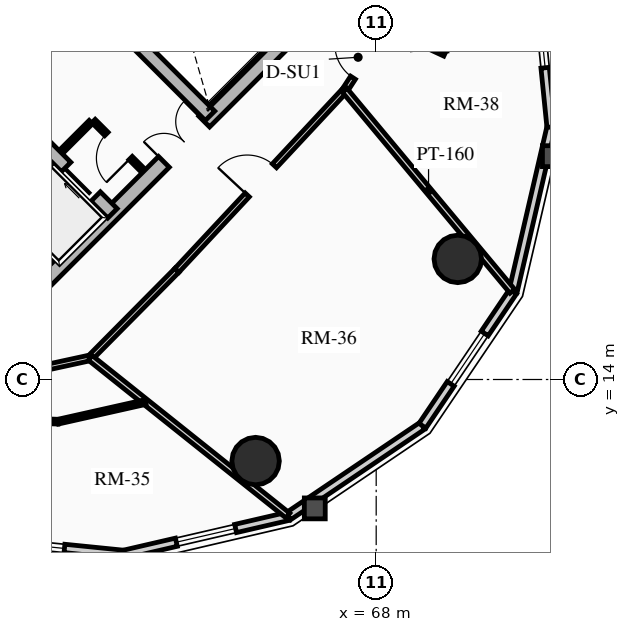
"""IFC4 building model, lengths in metres.
Left out: names, types, materials, properties, quantities, classifications, styles, units other than length and angle.
Written with IfcOpenShell. Run it as: python <this file> out.ifc"""

import sys

from ifc_helpers import new_model, si_unit, direction, frame, frame_2d, origin, origin_2d, place, context, subcontext, project, spatial, rectangle, circle, extrude, source, transform, mapped, element, fill, save


model = new_model("IFC4")
c1 = context("Model", 3, precision=1e-05, world=origin(), true_north=direction((0.0, 1.0)))
c2 = subcontext(c1, "Body", "Model", "MODEL_VIEW")
j1 = project(units=[si_unit("LENGTHUNIT", "METRE"), si_unit("PLANEANGLEUNIT", "RADIAN")], contexts=[c1])
p1 = place(None, origin())
s1 = spatial("IfcSite", under=j1, at=p1, CompositionType="ELEMENT")
p2 = place(p1, origin())
s2 = spatial("IfcBuilding", under=s1, at=p2, CompositionType="ELEMENT")
p3 = place(p2, frame((0.0, 0.0, 174.88)))
s3 = spatial("IfcBuildingStorey", under=s2, at=p3, CompositionType="ELEMENT", Elevation=174.88)
p4 = place(p3, frame((58.561, 15.873, 0.0), z_axis=(0.0, 0.0, 1.0), x_axis=(0.707106781187, 0.707106781187, 0.0)))
e1 = element("IfcWall", 1, at=p4, inside=s3, PredefinedType="SHEAR", context=c2, shape_type="SweptSolid", body=[
    extrude(rectangle(XDim=10.7, YDim=0.4, at=frame_2d((5.35, 0.0))), origin(), (0.0, 0.0, 1.0), 2.91),
])
m1 = source(origin(), c2, "Body", "SweptSolid", [
    extrude(rectangle(XDim=1.5, YDim=2.02, at=frame_2d((0.75, 1.01))), frame((0.0, 0.21, 0.0), z_axis=(0.0, -1.0, 0.0), x_axis=(1.0, 0.0, 0.0)), (0.0, 0.0, 1.0), 0.42),
])
p5 = place(p4, frame((5.45, 0.0, 0.0)))
e2 = element("IfcOpeningElement", 2, at=p5, cuts=e1, PredefinedType="OPENING", context=c2, shape_type="MappedRepresentation", body=[
    mapped(m1, transform((0.0, 0.0, 0.0), x_axis=(1.0, 0.0, 0.0), y_axis=(0.0, 1.0, 0.0), z_axis=(0.0, 0.0, 1.0), scale=1.0)),
])
p6 = place(p3, frame((61.06, 18.373, 0.0), z_axis=(0.0, 0.0, 1.0), x_axis=(-0.707106781187, 0.707106781187, 0.0)))
e3 = element("IfcWall", 3, at=p6, inside=s3, PredefinedType="SHEAR", context=c2, shape_type="SweptSolid", body=[
    extrude(rectangle(XDim=13.7, YDim=0.35, at=frame_2d((6.85, 0.0))), origin(), (0.0, 0.0, 1.0), 2.91),
])
m2 = source(origin(), c2, "Body", "SweptSolid", [
    extrude(rectangle(XDim=1.1, YDim=2.015, at=frame_2d((0.55, 1.007))), frame((0.0, 0.185, 0.0), z_axis=(0.0, -1.0, 0.0), x_axis=(1.0, 0.0, 0.0)), (0.0, 0.0, 1.0), 0.37),
])
p7 = place(p6, frame((4.85, 0.0, 0.0)))
e4 = element("IfcOpeningElement", 4, at=p7, cuts=e3, PredefinedType="OPENING", context=c2, shape_type="MappedRepresentation", body=[
    mapped(m2, transform((0.0, 0.0, 0.0), x_axis=(1.0, 0.0, 0.0), y_axis=(0.0, 1.0, 0.0), z_axis=(0.0, 0.0, 1.0), scale=1.0)),
])
p8 = place(p6, frame((0.625, 0.0, 0.0)))
e5 = element("IfcOpeningElement", 5, at=p8, cuts=e3, PredefinedType="OPENING", context=c2, shape_type="MappedRepresentation", body=[
    mapped(m2, transform((0.0, 0.0, 0.0), x_axis=(1.0, 0.0, 0.0), y_axis=(0.0, 1.0, 0.0), z_axis=(0.0, 0.0, 1.0), scale=1.0)),
])
p9 = place(p6, frame((2.625, 0.0, 0.0)))
e6 = element("IfcOpeningElement", 6, at=p9, cuts=e3, PredefinedType="OPENING", context=c2, shape_type="MappedRepresentation", body=[
    mapped(m2, transform((0.0, 0.0, 0.0), x_axis=(1.0, 0.0, 0.0), y_axis=(0.0, 1.0, 0.0), z_axis=(0.0, 0.0, 1.0), scale=1.0)),
])
m3 = source(origin(), c2, "Body", "SweptSolid", [
    extrude(rectangle(XDim=1.15, YDim=2.02, at=frame_2d((0.575, 1.01))), frame((0.0, 0.185, 0.0), z_axis=(0.0, -1.0, 0.0), x_axis=(1.0, 0.0, 0.0)), (0.0, 0.0, 1.0), 0.37),
])
p10 = place(p6, frame((7.27, 0.0, 0.0)))
e7 = element("IfcOpeningElement", 7, at=p10, cuts=e3, PredefinedType="OPENING", context=c2, shape_type="MappedRepresentation", body=[
    mapped(m3, transform((0.0, 0.0, 0.0), x_axis=(1.0, 0.0, 0.0), y_axis=(0.0, 1.0, 0.0), z_axis=(0.0, 0.0, 1.0), scale=1.0)),
])
p11 = place(p3, frame((63.627, 20.94, 0.0), z_axis=(0.0, 0.0, 1.0), x_axis=(-0.707119496762, 0.707094065383, 0.0)))
e8 = element("IfcWall", 8, at=p11, inside=s3, PredefinedType="SHEAR", context=c2, shape_type="SweptSolid", body=[
    extrude(rectangle(XDim=9.6, YDim=0.35, at=frame_2d((4.8, 0.0))), origin(), (0.0, 0.0, 1.0), 2.91),
])
p12 = place(p11, frame((5.28, 0.0, 0.0)))
e9 = element("IfcOpeningElement", 9, at=p12, cuts=e8, PredefinedType="OPENING", context=c2, shape_type="MappedRepresentation", body=[
    mapped(m3, transform((0.0, 0.0, 0.0), x_axis=(1.0, 0.0, 0.0), y_axis=(0.0, 1.0, 0.0), z_axis=(0.0, 0.0, 1.0), scale=1.0)),
])
for number, where, z_axis, x_axis in (
    (10, (64.827, 11.854, 0.0), (0.0, 0.0, 1.0), (1.0, 0.0, 0.0)),
    (11, (70.146, 17.173, 0.0), (0.0, 0.0, 1.0), (1.0, 0.0, 0.0)),
):
    element("IfcColumn", number, at=place(p3, frame(where, z_axis=z_axis, x_axis=x_axis)), inside=s3, PredefinedType="USERDEFINED", context=c2, shape_type="SweptSolid", body=[
        extrude(circle(Radius=0.625, at=origin_2d()), origin(), (0.0, 0.0, 1.0), 2.91),
    ])
p13 = place(p3, frame((61.355, 9.397, 0.0), z_axis=(0.0, 0.0, 1.0), x_axis=(-0.994943283129, 0.100438356004, 0.0)))
e12 = element("IfcWall", 12, at=p13, inside=s3, PredefinedType="SOLIDWALL", context=c2, shape_type="SweptSolid", body=[
    extrude(rectangle(XDim=4.733, YDim=0.22, at=frame_2d((2.366, 0.0))), origin(), (0.0, 0.0, 1.0), 2.245),
])
m4 = source(origin(), c2, "Body", "SweptSolid", [
    extrude(rectangle(XDim=1.6, YDim=1.3, at=frame_2d((0.8, 0.65))), frame((0.0, 0.12, 0.0), z_axis=(0.0, -1.0, 0.0), x_axis=(1.0, 0.0, 0.0)), (0.0, 0.0, 1.0), 0.24),
])
p14 = place(p13, frame((1.566, 0.0, 0.65)))
e13 = element("IfcOpeningElement", 13, at=p14, cuts=e12, PredefinedType="OPENING", context=c2, shape_type="MappedRepresentation", body=[
    mapped(m4, transform((0.0, 0.0, 0.0), x_axis=(1.0, 0.0, 0.0), y_axis=(0.0, 1.0, 0.0), z_axis=(0.0, 0.0, 1.0), scale=1.0)),
])
p15 = place(p3, frame((65.687, 10.4, 0.0), z_axis=(0.0, 0.0, 1.0), x_axis=(-0.97422620202, -0.22557328587, 0.0)))
e14 = element("IfcWall", 14, at=p15, inside=s3, PredefinedType="SOLIDWALL", context=c2, shape_type="SweptSolid", body=[
    extrude(rectangle(XDim=4.446, YDim=0.22, at=frame_2d((2.223, 0.0))), origin(), (0.0, 0.0, 1.0), 2.245),
])
p16 = place(p15, frame((1.423, 0.0, 0.65)))
e15 = element("IfcOpeningElement", 15, at=p16, cuts=e14, PredefinedType="OPENING", context=c2, shape_type="MappedRepresentation", body=[
    mapped(m4, transform((0.0, 0.0, 0.0), x_axis=(1.0, 0.0, 0.0), y_axis=(0.0, 1.0, 0.0), z_axis=(0.0, 0.0, 1.0), scale=1.0)),
])
p17 = place(p3, frame((69.217, 12.783, 0.0), z_axis=(0.0, 0.0, 1.0), x_axis=(-0.828817439852, -0.55951912514, 0.0)))
e16 = element("IfcWall", 16, at=p17, inside=s3, PredefinedType="SOLIDWALL", context=c2, shape_type="SweptSolid", body=[
    extrude(rectangle(XDim=4.259, YDim=0.22, at=frame_2d((2.129, 0.0))), origin(), (0.0, 0.0, 1.0), 2.245),
])
p18 = place(p3, frame((71.6, 16.313, 0.0), z_axis=(0.0, 0.0, 1.0), x_axis=(-0.55951912514, -0.828817439852, 0.0)))
e17 = element("IfcWall", 17, at=p18, inside=s3, PredefinedType="SOLIDWALL", context=c2, shape_type="SweptSolid", body=[
    extrude(rectangle(XDim=4.259, YDim=0.22, at=frame_2d((2.129, 0.0))), origin(), (0.0, 0.0, 1.0), 2.245),
])
p19 = place(p18, frame((1.33, 0.0, 0.65)))
e18 = element("IfcOpeningElement", 18, at=p19, cuts=e17, PredefinedType="OPENING", context=c2, shape_type="MappedRepresentation", body=[
    mapped(m4, transform((0.0, 0.0, 0.0), x_axis=(1.0, 0.0, 0.0), y_axis=(0.0, 1.0, 0.0), z_axis=(0.0, 0.0, 1.0), scale=1.0)),
])
p20 = place(p3, frame((72.603, 20.645, 0.0), z_axis=(0.0, 0.0, 1.0), x_axis=(-0.22557328587, -0.97422620202, 0.0)))
e19 = element("IfcWall", 19, at=p20, inside=s3, PredefinedType="SOLIDWALL", context=c2, shape_type="SweptSolid", body=[
    extrude(rectangle(XDim=4.446, YDim=0.22, at=frame_2d((2.223, 0.0))), origin(), (0.0, 0.0, 1.0), 2.245),
])
p21 = place(p3, frame((72.127, 25.354, 0.0), z_axis=(0.0, 0.0, 1.0), x_axis=(0.100438356004, -0.994943283129, 0.0)))
e20 = element("IfcWall", 20, at=p21, inside=s3, PredefinedType="SOLIDWALL", context=c2, shape_type="SweptSolid", body=[
    extrude(rectangle(XDim=4.733, YDim=0.22, at=frame_2d((2.366, 0.0))), origin(), (0.0, 0.0, 1.0), 2.245),
])
p22 = place(p21, frame((1.566, 0.0, 0.65)))
e21 = element("IfcOpeningElement", 21, at=p22, cuts=e20, PredefinedType="OPENING", context=c2, shape_type="MappedRepresentation", body=[
    mapped(m4, transform((0.0, 0.0, 0.0), x_axis=(1.0, 0.0, 0.0), y_axis=(0.0, 1.0, 0.0), z_axis=(0.0, 0.0, 1.0), scale=1.0)),
])
p23 = place(p3, frame((58.214, 21.467, 0.0), z_axis=(0.0, 0.0, 1.0), x_axis=(0.707106781187, 0.707106781187, 0.0)))
e22 = element("IfcWall", 22, at=p23, inside=s3, PredefinedType="PARTITIONING", context=c2, shape_type="SweptSolid", body=[
    extrude(rectangle(XDim=3.28, YDim=0.2, at=frame_2d((1.64, 0.0))), origin(), (0.0, 0.0, 1.0), 2.675),
])
m5 = source(origin(), c2, "Body", "SweptSolid", [
    extrude(rectangle(XDim=1.5, YDim=2.02, at=frame_2d((0.75, 1.01))), frame((0.0, 0.11, 0.0), z_axis=(0.0, -1.0, 0.0), x_axis=(1.0, 0.0, 0.0)), (0.0, 0.0, 1.0), 0.22),
])
p24 = place(p23, frame((1.55, 0.0, 0.0)))
e23 = element("IfcOpeningElement", 23, at=p24, cuts=e22, PredefinedType="OPENING", context=c2, shape_type="MappedRepresentation", body=[
    mapped(m5, transform((0.0, 0.0, 0.0), x_axis=(1.0, 0.0, 0.0), y_axis=(0.0, 1.0, 0.0), z_axis=(0.0, 0.0, 1.0), scale=1.0)),
])
p25 = place(p3, frame((61.835, 19.529, 0.0), z_axis=(0.0, 0.0, 1.0), x_axis=(-0.707174592913, 0.707038962956, 0.0)))
e24 = element("IfcWall", 24, at=p25, inside=s3, PredefinedType="PARTITIONING", context=c2, shape_type="SweptSolid", body=[
    extrude(rectangle(XDim=1.8, YDim=0.125, at=frame_2d((0.9, 0.0))), origin(), (0.0, 0.0, 1.0), 2.675),
])
m6 = source(origin(), c2, "Body", "SweptSolid", [
    extrude(rectangle(XDim=0.9, YDim=2.005, at=frame_2d((0.45, 1.002))), frame((0.0, 0.073, 0.0), z_axis=(0.0, -1.0, 0.0), x_axis=(1.0, 0.0, 0.0)), (0.0, 0.0, 1.0), 0.145),
])
p26 = place(p25, frame((0.42, 0.0, 0.0)))
e25 = element("IfcOpeningElement", 25, at=p26, cuts=e24, PredefinedType="OPENING", context=c2, shape_type="MappedRepresentation", body=[
    mapped(m6, transform((0.0, 0.0, 0.0), x_axis=(1.0, 0.0, 0.0), y_axis=(0.0, 1.0, 0.0), z_axis=(0.0, 0.0, 1.0), scale=1.0)),
])
p27 = place(p3, frame((59.713, 19.996, 0.0), z_axis=(0.0, 0.0, 1.0), x_axis=(0.707217726, 0.706995818963, 0.0)))
e26 = element("IfcWall", 26, at=p27, inside=s3, PredefinedType="PARTITIONING", context=c2, shape_type="SweptSolid", body=[
    extrude(rectangle(XDim=1.1, YDim=0.125, at=frame_2d((0.55, 0.0))), origin(), (0.0, 0.0, 1.0), 2.675),
])
p28 = place(p3, frame((58.959, 14.241, 0.0), z_axis=(0.0, 0.0, 1.0), x_axis=(0.977216106897, 0.212246744196, 0.0)))
e27 = element("IfcWall", 27, at=p28, inside=s3, PredefinedType="PARTITIONING", context=c2, shape_type="SweptSolid", body=[
    extrude(rectangle(XDim=1.552, YDim=0.15, at=frame_2d((0.776, 0.0))), origin(), (0.0, 0.0, 1.0), 2.245),
])
p29 = place(p3, frame((60.475, 14.57, 0.0), z_axis=(0.0, 0.0, 1.0), x_axis=(0.703709284374, 0.710488031628, 0.0)))
e28 = element("IfcWall", 28, at=p29, inside=s3, PredefinedType="PARTITIONING", context=c2, shape_type="SweptSolid", body=[
    extrude(rectangle(XDim=3.241, YDim=0.15, at=frame_2d((1.621, 0.0))), origin(), (0.0, 0.0, 1.0), 2.245),
])
p30 = place(p3, frame((62.756, 16.873, 0.0), z_axis=(0.0, 0.0, 1.0), x_axis=(0.682136885079, 0.73122450042, 0.0)))
e29 = element("IfcWall", 29, at=p30, inside=s3, PredefinedType="PARTITIONING", context=c2, shape_type="SweptSolid", body=[
    extrude(rectangle(XDim=6.476, YDim=0.15, at=frame_2d((3.238, 0.0))), origin(), (0.0, 0.0, 1.0), 2.245),
])
m7 = source(origin(), c2, "Body", "SweptSolid", [
    extrude(rectangle(XDim=1.05, YDim=2.015, at=frame_2d((0.525, 1.007))), frame((0.0, 0.085, 0.0), z_axis=(0.0, -1.0, 0.0), x_axis=(1.0, 0.0, 0.0)), (0.0, 0.0, 1.0), 0.17),
])
p31 = place(p30, frame((2.713, 0.0, 0.0)))
e30 = element("IfcOpeningElement", 30, at=p31, cuts=e29, PredefinedType="OPENING", context=c2, shape_type="MappedRepresentation", body=[
    mapped(m7, transform((0.0, 0.0, 0.0), x_axis=(1.0, 0.0, 0.0), y_axis=(0.0, 1.0, 0.0), z_axis=(0.0, 0.0, 1.0), scale=1.0)),
])
p32 = place(p3, frame((67.173, 21.608, 0.0), z_axis=(0.0, 0.0, 1.0), x_axis=(0.544299403682, 0.838891029367, 0.0)))
e31 = element("IfcWall", 31, at=p32, inside=s3, PredefinedType="PARTITIONING", context=c2, shape_type="SweptSolid", body=[
    extrude(rectangle(XDim=1.844, YDim=0.15, at=frame_2d((0.922, 0.0))), origin(), (0.0, 0.0, 1.0), 2.245),
])
p33 = place(p32, frame((0.397, 0.0, 0.0)))
e32 = element("IfcOpeningElement", 32, at=p33, cuts=e31, PredefinedType="OPENING", context=c2, shape_type="MappedRepresentation", body=[
    mapped(m7, transform((0.0, 0.0, 0.0), x_axis=(1.0, 0.0, 0.0), y_axis=(0.0, 1.0, 0.0), z_axis=(0.0, 0.0, 1.0), scale=1.0)),
])
p34 = place(p3, frame((60.475, 14.57, 0.0), z_axis=(0.0, 0.0, 1.0), x_axis=(0.78156967059, -0.623817962241, 0.0)))
e33 = element("IfcWall", 33, at=p34, inside=s3, PredefinedType="PARTITIONING", context=c2, shape_type="SweptSolid", body=[
    extrude(rectangle(XDim=6.656, YDim=0.16, at=frame_2d((3.328, 0.0))), origin(), (0.0, 0.0, 1.0), 2.245),
])
p35 = place(p3, frame((67.173, 21.608, 0.0), z_axis=(0.0, 0.0, 1.0), x_axis=(0.64050880156, -0.767950828585, 0.0)))
e34 = element("IfcWall", 34, at=p35, inside=s3, PredefinedType="PARTITIONING", context=c2, shape_type="SweptSolid", body=[
    extrude(rectangle(XDim=6.883, YDim=0.16, at=frame_2d((3.441, 0.0))), origin(), (0.0, 0.0, 1.0), 2.245),
])
p36 = place(p3, frame((57.263, 12.972, 0.0), z_axis=(0.0, 0.0, 1.0), x_axis=(0.999399614086, -0.034646953192, 0.0)))
e35 = element("IfcWall", 35, at=p36, inside=s3, PredefinedType="PARTITIONING", context=c2, shape_type="SweptSolid", body=[
    extrude(rectangle(XDim=2.368, YDim=0.125, at=frame_2d((1.184, 0.0))), origin(), (0.0, 0.0, 1.0), 2.245),
])
p37 = place(p3, frame((59.629, 12.89, 0.0), z_axis=(0.0, 0.0, 1.0), x_axis=(0.97566344203, 0.219273454585, 0.0)))
e36 = element("IfcWall", 36, at=p37, inside=s3, PredefinedType="PARTITIONING", context=c2, shape_type="SweptSolid", body=[
    extrude(rectangle(XDim=2.36, YDim=0.125, at=frame_2d((1.18, 0.0))), origin(), (0.0, 0.0, 1.0), 2.245),
])
p38 = place(p3, frame((68.275, 23.28, 0.0), z_axis=(0.0, 0.0, 1.0), x_axis=(0.906681243062, -0.421816457099, 0.0)))
e37 = element("IfcWall", 37, at=p38, inside=s3, PredefinedType="PARTITIONING", context=c2, shape_type="SweptSolid", body=[
    extrude(rectangle(XDim=1.688, YDim=0.125, at=frame_2d((0.844, 0.0))), origin(), (0.0, 0.0, 1.0), 2.312),
])
m8 = source(origin(), c2, "Body", "SweptSolid", [
    extrude(rectangle(XDim=1.6, YDim=1.3, at=frame_2d((0.8, 0.65))), frame((0.0, 0.03, 0.0), z_axis=(0.0, -1.0, 0.0), x_axis=(1.0, 0.0, 0.0)), (0.0, 0.0, 1.0), 0.06),
])
p39 = place(p14, origin())
e38 = element("IfcWindow", 38, at=p39, inside=s3, PartitioningType="SINGLE_PANEL", PredefinedType="WINDOW", context=c2, shape_type="MappedRepresentation", body=[
    mapped(m8, transform((0.0, 0.0, 0.0), x_axis=(1.0, 0.0, 0.0), y_axis=(0.0, 1.0, 0.0), z_axis=(0.0, 0.0, 1.0), scale=1.0)),
])
fill(e13, e38)
p40 = place(p16, origin())
e39 = element("IfcWindow", 39, at=p40, inside=s3, PartitioningType="SINGLE_PANEL", PredefinedType="WINDOW", context=c2, shape_type="MappedRepresentation", body=[
    mapped(m8, transform((0.0, 0.0, 0.0), x_axis=(1.0, 0.0, 0.0), y_axis=(0.0, 1.0, 0.0), z_axis=(0.0, 0.0, 1.0), scale=1.0)),
])
fill(e15, e39)
p41 = place(p19, origin())
e40 = element("IfcWindow", 40, at=p41, inside=s3, PartitioningType="SINGLE_PANEL", PredefinedType="WINDOW", context=c2, shape_type="MappedRepresentation", body=[
    mapped(m8, transform((0.0, 0.0, 0.0), x_axis=(1.0, 0.0, 0.0), y_axis=(0.0, 1.0, 0.0), z_axis=(0.0, 0.0, 1.0), scale=1.0)),
])
fill(e18, e40)
p42 = place(p22, origin())
e41 = element("IfcWindow", 41, at=p42, inside=s3, PartitioningType="SINGLE_PANEL", PredefinedType="WINDOW", context=c2, shape_type="MappedRepresentation", body=[
    mapped(m8, transform((0.0, 0.0, 0.0), x_axis=(1.0, 0.0, 0.0), y_axis=(0.0, 1.0, 0.0), z_axis=(0.0, 0.0, 1.0), scale=1.0)),
])
fill(e21, e41)
m9 = source(origin(), c2, "Body", "SweptSolid", [
    extrude(rectangle(XDim=1.1, YDim=2.015, at=frame_2d((0.55, 1.007))), frame((0.0, 0.025, 0.0), z_axis=(0.0, -1.0, 0.0), x_axis=(1.0, 0.0, 0.0)), (0.0, 0.0, 1.0), 0.05),
])
p43 = place(p8, origin())
e42 = element("IfcDoor", 42, at=p43, inside=s3, OperationType="SLIDING_TO_RIGHT", PredefinedType="DOOR", context=c2, shape_type="MappedRepresentation", body=[
    mapped(m9, transform((0.0, 0.0, 0.0), x_axis=(1.0, 0.0, 0.0), y_axis=(0.0, 1.0, 0.0), z_axis=(0.0, 0.0, 1.0), scale=1.0)),
])
fill(e5, e42)
m10 = source(origin(), c2, "Body", "SweptSolid", [
    extrude(rectangle(XDim=1.5, YDim=2.02, at=frame_2d((0.75, 1.01))), frame((0.0, 0.025, 0.0), z_axis=(0.0, -1.0, 0.0), x_axis=(1.0, 0.0, 0.0)), (0.0, 0.0, 1.0), 0.05),
])
p44 = place(p5, origin())
e43 = element("IfcDoor", 43, at=p44, inside=s3, OperationType="DOUBLE_DOOR_SINGLE_SWING", PredefinedType="DOOR", context=c2, shape_type="MappedRepresentation", body=[
    mapped(m10, transform((0.0, 0.0, 0.0), x_axis=(1.0, 0.0, 0.0), y_axis=(0.0, 1.0, 0.0), z_axis=(0.0, 0.0, 1.0), scale=1.0)),
])
fill(e2, e43)
p45 = place(p24, origin())
e44 = element("IfcDoor", 44, at=p45, inside=s3, OperationType="DOUBLE_DOOR_SINGLE_SWING", PredefinedType="DOOR", context=c2, shape_type="MappedRepresentation", body=[
    mapped(m10, transform((0.0, 0.0, 0.0), x_axis=(1.0, 0.0, 0.0), y_axis=(0.0, 1.0, 0.0), z_axis=(0.0, 0.0, 1.0), scale=1.0)),
])
fill(e23, e44)
m11 = source(origin(), c2, "Body", "SweptSolid", [
    extrude(rectangle(XDim=0.9, YDim=2.005, at=frame_2d((0.45, 1.002))), frame((0.0, 0.025, 0.0), z_axis=(0.0, -1.0, 0.0), x_axis=(1.0, 0.0, 0.0)), (0.0, 0.0, 1.0), 0.05),
])
p46 = place(p26, origin())
e45 = element("IfcDoor", 45, at=p46, inside=s3, OperationType="SINGLE_SWING_LEFT", PredefinedType="DOOR", context=c2, shape_type="MappedRepresentation", body=[
    mapped(m11, transform((0.0, 0.0, 0.0), x_axis=(1.0, 0.0, 0.0), y_axis=(0.0, 1.0, 0.0), z_axis=(0.0, 0.0, 1.0), scale=1.0)),
])
fill(e25, e45)
m12 = source(origin(), c2, "Body", "SweptSolid", [
    extrude(rectangle(XDim=1.05, YDim=2.015, at=frame_2d((0.525, 1.007))), frame((0.0, 0.025, 0.0), z_axis=(0.0, -1.0, 0.0), x_axis=(1.0, 0.0, 0.0)), (0.0, 0.0, 1.0), 0.05),
])
p47 = place(p31, origin())
e46 = element("IfcDoor", 46, at=p47, inside=s3, OperationType="SINGLE_SWING_LEFT", PredefinedType="DOOR", context=c2, shape_type="MappedRepresentation", body=[
    mapped(m12, transform((0.0, 0.0, 0.0), x_axis=(1.0, 0.0, 0.0), y_axis=(0.0, 1.0, 0.0), z_axis=(0.0, 0.0, 1.0), scale=1.0)),
])
fill(e30, e46)
p48 = place(p33, origin())
e47 = element("IfcDoor", 47, at=p48, inside=s3, OperationType="SINGLE_SWING_RIGHT", PredefinedType="DOOR", context=c2, shape_type="MappedRepresentation", body=[
    mapped(m12, transform((0.0, 0.0, 0.0), x_axis=(1.0, 0.0, 0.0), y_axis=(0.0, 1.0, 0.0), z_axis=(0.0, 0.0, 1.0), scale=1.0)),
])
fill(e32, e47)
save(model, sys.argv[1])
